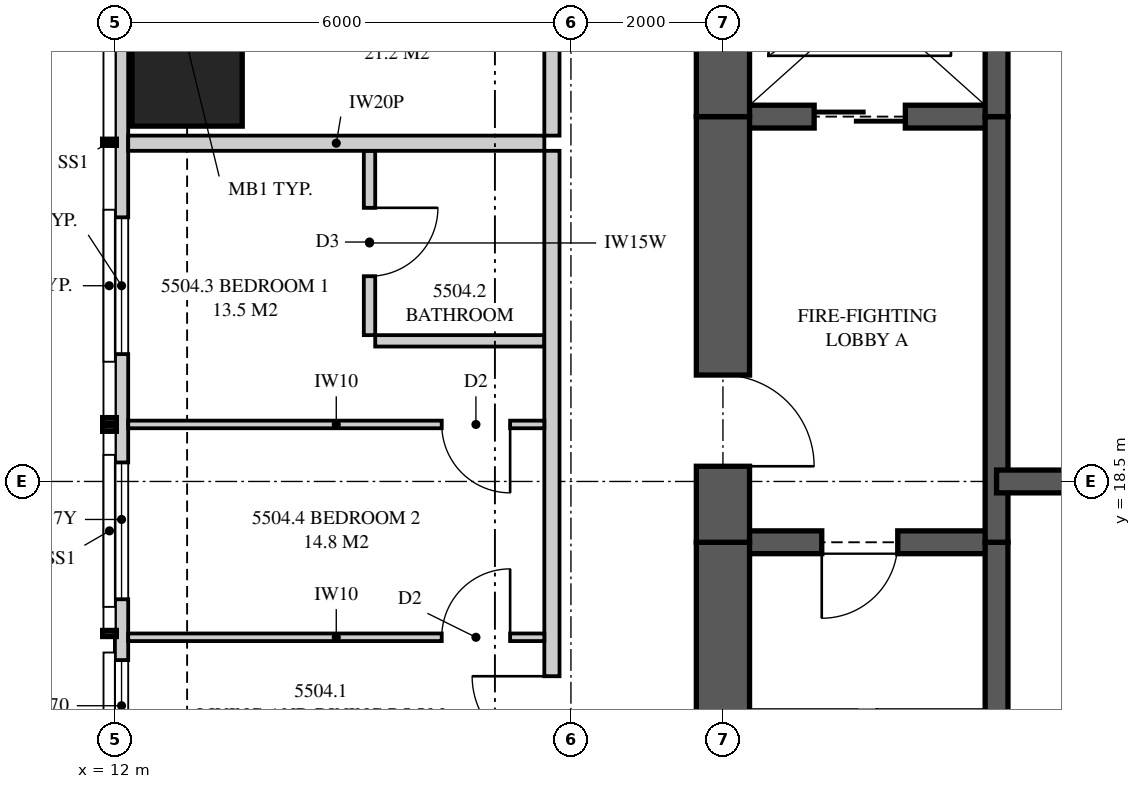
"""IFC4 building model, lengths in metres.
Left out: names, types, materials, properties, quantities, classifications, styles, units other than length and angle.
Written with IfcOpenShell. Run it as: python <this file> out.ifc"""

import sys

from ifc_helpers import new_model, si_unit, direction, frame, frame_2d, origin, origin_2d, place, context, subcontext, project, spatial, polyline, rectangle, outline, extrude, element, fill, save


model = new_model("IFC4")
c1 = context("Model", 3, precision=1e-05, world=origin(), true_north=direction((0.0, 1.0)))
c2 = subcontext(c1, "Body", "Model", "MODEL_VIEW")
j1 = project(units=[si_unit("LENGTHUNIT", "METRE"), si_unit("PLANEANGLEUNIT", "RADIAN")], contexts=[c1])
p1 = place(None, origin())
s1 = spatial("IfcSite", under=j1, at=p1, CompositionType="ELEMENT")
p2 = place(p1, origin())
s2 = spatial("IfcBuilding", under=s1, at=p2, CompositionType="ELEMENT")
p3 = place(p2, frame((0.0, 0.0, 201.25)))
s3 = spatial("IfcBuildingStorey", under=s2, at=p3, CompositionType="ELEMENT", Elevation=201.25)
p4 = place(p3, frame((12.95, 25.0, 0.0), z_axis=(0.0, 0.0, 1.0), x_axis=(1.0, 0.0, 0.0)))
e1 = element("IfcColumn", 1, at=p4, inside=s3, PredefinedType="COLUMN", context=c2, shape_type="SweptSolid", body=[
    extrude(rectangle(XDim=1.45, YDim=3.65, at=origin_2d()), origin(), (0.0, 0.0, 1.0), 3.35),
])
p5 = place(p3, frame((20.0, 26.225, 0.0), z_axis=(0.0, 0.0, 1.0), x_axis=(0.0, -1.0, 0.0)))
e2 = element("IfcWall", 2, at=p5, inside=s3, PredefinedType="SHEAR", context=c2, shape_type="SweptSolid", body=[
    extrude(rectangle(XDim=2.925, YDim=0.7, at=frame_2d((1.462, 0.0))), origin(), (0.0, 0.0, 1.0), 3.35),
])
p6 = place(p3, frame((20.0, 23.3, 0.0), z_axis=(0.0, 0.0, 1.0), x_axis=(0.0, -1.0, 0.0)))
e3 = element("IfcWall", 3, at=p6, inside=s3, PredefinedType="SHEAR", context=c2, shape_type="SweptSolid", body=[
    extrude(rectangle(XDim=5.6, YDim=0.7, at=frame_2d((2.8, 0.0))), origin(), (0.0, 0.0, 1.0), 3.35),
])
p7 = place(p6, frame((3.4, 0.0, 0.0)))
e4 = element("IfcOpeningElement", 4, at=p7, cuts=e3, PredefinedType="OPENING", context=c2, shape_type="SweptSolid", body=[
    extrude(rectangle(XDim=1.2, YDim=2.2, at=frame_2d((0.6, 1.1))), frame((0.0, 0.36, 0.0), z_axis=(0.0, -1.0, 0.0), x_axis=(1.0, 0.0, 0.0)), (0.0, 0.0, 1.0), 0.72),
])
p8 = place(p3, frame((20.0, 17.7, 0.0), z_axis=(0.0, 0.0, 1.0), x_axis=(0.0, -1.0, 0.0)))
e5 = element("IfcWall", 5, at=p8, inside=s3, PredefinedType="SHEAR", context=c2, shape_type="SweptSolid", body=[
    extrude(rectangle(XDim=4.7, YDim=0.7, at=frame_2d((2.35, 0.0))), origin(), (0.0, 0.0, 1.0), 3.35),
])
p9 = place(p3, frame((23.6, 10.775, 0.0), z_axis=(0.0, 0.0, 1.0), x_axis=(0.0, 1.0, 0.0)))
e6 = element("IfcWall", 6, at=p9, inside=s3, PredefinedType="SHEAR", context=c2, shape_type="SweptSolid", body=[
    extrude(rectangle(XDim=6.925, YDim=0.3, at=frame_2d((3.462, 0.0))), origin(), (0.0, 0.0, 1.0), 3.35),
])
p10 = place(p3, frame((23.6, 17.7, 0.0), z_axis=(0.0, 0.0, 1.0), x_axis=(0.0, 1.0, 0.0)))
e7 = element("IfcWall", 7, at=p10, inside=s3, PredefinedType="SHEAR", context=c2, shape_type="SweptSolid", body=[
    extrude(rectangle(XDim=5.6, YDim=0.3, at=frame_2d((2.8, 0.0))), origin(), (0.0, 0.0, 1.0), 3.35),
])
p11 = place(p3, frame((23.6, 23.3, 0.0), z_axis=(0.0, 0.0, 1.0), x_axis=(0.0, 1.0, 0.0)))
e8 = element("IfcWall", 8, at=p11, inside=s3, PredefinedType="SHEAR", context=c2, shape_type="SweptSolid", body=[
    extrude(rectangle(XDim=2.925, YDim=0.3, at=frame_2d((1.462, 0.0))), origin(), (0.0, 0.0, 1.0), 3.35),
])
p12 = place(p3, frame((20.0, 17.7, 0.0), z_axis=(0.0, 0.0, 1.0), x_axis=(1.0, 0.0, 0.0)))
e9 = element("IfcWall", 9, at=p12, inside=s3, PredefinedType="SHEAR", context=c2, shape_type="SweptSolid", body=[
    extrude(rectangle(XDim=3.6, YDim=0.3, at=frame_2d((1.8, 0.0))), origin(), (0.0, 0.0, 1.0), 3.35),
])
p13 = place(p12, frame((1.3, 0.0, 0.0)))
e10 = element("IfcOpeningElement", 10, at=p13, cuts=e9, PredefinedType="OPENING", context=c2, shape_type="SweptSolid", body=[
    extrude(rectangle(XDim=1.0, YDim=2.1, at=frame_2d((0.5, 1.05))), frame((0.0, 0.16, 0.0), z_axis=(0.0, -1.0, 0.0), x_axis=(1.0, 0.0, 0.0)), (0.0, 0.0, 1.0), 0.32),
])
p14 = place(p3, frame((20.0, 23.3, 0.0), z_axis=(0.0, 0.0, 1.0), x_axis=(1.0, 0.0, 0.0)))
e11 = element("IfcWall", 11, at=p14, inside=s3, PredefinedType="SHEAR", context=c2, shape_type="SweptSolid", body=[
    extrude(rectangle(XDim=3.6, YDim=0.3, at=frame_2d((1.8, 0.0))), origin(), (0.0, 0.0, 1.0), 3.35),
])
p15 = place(p14, frame((1.2, 0.0, 0.0)))
e12 = element("IfcOpeningElement", 12, at=p15, cuts=e11, PredefinedType="OPENING", context=c2, shape_type="SweptSolid", body=[
    extrude(rectangle(XDim=1.2, YDim=2.1, at=frame_2d((0.6, 1.05))), frame((0.0, 0.16, 0.0), z_axis=(0.0, -1.0, 0.0), x_axis=(1.0, 0.0, 0.0)), (0.0, 0.0, 1.0), 0.32),
])
p16 = place(p3, frame((23.6, 18.5, 0.0), z_axis=(0.0, 0.0, 1.0), x_axis=(1.0, 0.0, 0.0)))
e13 = element("IfcWall", 13, at=p16, inside=s3, PredefinedType="SHEAR", context=c2, shape_type="SweptSolid", body=[
    extrude(rectangle(XDim=2.4, YDim=0.3, at=frame_2d((1.2, 0.0))), origin(), (0.0, 0.0, 1.0), 3.35),
])
p17 = place(p3, frame((12.087, 32.949, 0.0), z_axis=(0.0, 0.0, 1.0), x_axis=(0.0, -1.0, 0.0)))
e14 = element("IfcWall", 14, at=p17, inside=s3, PredefinedType="SOLIDWALL", context=c2, shape_type="SweptSolid", body=[
    extrude(outline(polyline([(0.0, 0.0), (29.897, 0.0), (29.897, 3.11), (20.191, 3.11), (20.191, 2.15), (20.051, 2.15), (20.051, 3.11), (19.949, 3.11), (19.949, 2.15), (7.949, 2.15), (7.949, 3.11), (7.823, 3.11), (7.823, 2.15), (7.73, 2.15), (7.73, 3.11), (0.0, 3.11), (0.0, 0.0)])), frame((0.0, 0.087, 0.0), z_axis=(0.0, -1.0, 0.0), x_axis=(1.0, 0.0, 0.0)), (0.0, 0.0, 1.0), 0.175),
])
p18 = place(p17, frame((1.226, 0.0, 0.4)))
e15 = element("IfcOpeningElement", 15, at=p18, cuts=e14, PredefinedType="OPENING", context=c2, shape_type="SweptSolid", body=[
    extrude(rectangle(XDim=1.8, YDim=1.7, at=frame_2d((0.9, 0.85))), frame((0.0, 0.097, 0.0), z_axis=(0.0, -1.0, 0.0), x_axis=(1.0, 0.0, 0.0)), (0.0, 0.0, 1.0), 0.195),
])
p19 = place(p17, frame((4.224, 0.0, 0.4)))
e16 = element("IfcOpeningElement", 16, at=p19, cuts=e14, PredefinedType="OPENING", context=c2, shape_type="SweptSolid", body=[
    extrude(rectangle(XDim=1.8, YDim=1.7, at=frame_2d((0.9, 0.85))), frame((0.0, 0.097, 0.0), z_axis=(0.0, -1.0, 0.0), x_axis=(1.0, 0.0, 0.0)), (0.0, 0.0, 1.0), 0.195),
])
p20 = place(p17, frame((10.974, 0.0, 0.4)))
e17 = element("IfcOpeningElement", 17, at=p20, cuts=e14, PredefinedType="OPENING", context=c2, shape_type="SweptSolid", body=[
    extrude(rectangle(XDim=1.8, YDim=1.7, at=frame_2d((0.9, 0.85))), frame((0.0, 0.097, 0.0), z_axis=(0.0, -1.0, 0.0), x_axis=(1.0, 0.0, 0.0)), (0.0, 0.0, 1.0), 0.195),
])
p21 = place(p17, frame((14.199, 0.0, 0.4)))
e18 = element("IfcOpeningElement", 18, at=p21, cuts=e14, PredefinedType="OPENING", context=c2, shape_type="SweptSolid", body=[
    extrude(rectangle(XDim=1.8, YDim=1.7, at=frame_2d((0.9, 0.85))), frame((0.0, 0.097, 0.0), z_axis=(0.0, -1.0, 0.0), x_axis=(1.0, 0.0, 0.0)), (0.0, 0.0, 1.0), 0.195),
])
p22 = place(p17, frame((22.624, 0.0, 0.0)))
e19 = element("IfcOpeningElement", 19, at=p22, cuts=e14, PredefinedType="OPENING", context=c2, shape_type="SweptSolid", body=[
    extrude(rectangle(XDim=1.8, YDim=2.1, at=frame_2d((0.9, 1.05))), frame((0.0, 0.097, 0.0), z_axis=(0.0, -1.0, 0.0), x_axis=(1.0, 0.0, 0.0)), (0.0, 0.0, 1.0), 0.195),
])
p23 = place(p17, frame((16.799, 0.0, 0.4)))
e20 = element("IfcOpeningElement", 20, at=p23, cuts=e14, PredefinedType="OPENING", context=c2, shape_type="SweptSolid", body=[
    extrude(rectangle(XDim=1.2, YDim=1.7, at=frame_2d((0.6, 0.85))), frame((0.0, 0.097, 0.0), z_axis=(0.0, -1.0, 0.0), x_axis=(1.0, 0.0, 0.0)), (0.0, 0.0, 1.0), 0.195),
])
p24 = place(p17, frame((26.371, 0.0, 0.4)))
e21 = element("IfcOpeningElement", 21, at=p24, cuts=e14, PredefinedType="OPENING", context=c2, shape_type="SweptSolid", body=[
    extrude(rectangle(XDim=1.8, YDim=1.7, at=frame_2d((0.9, 0.85))), frame((0.0, 0.097, 0.0), z_axis=(0.0, -1.0, 0.0), x_axis=(1.0, 0.0, 0.0)), (0.0, 0.0, 1.0), 0.195),
])
p25 = place(p3, frame((12.175, 22.95, 0.0), z_axis=(0.0, 0.0, 1.0), x_axis=(1.0, 0.0, 0.0)))
e22 = element("IfcWall", 22, at=p25, inside=s3, PredefinedType="PARTITIONING", context=c2, shape_type="SweptSolid", body=[
    extrude(outline(polyline([(0.0, 0.0), (5.475, 0.0), (5.475, 3.11), (1.685, 3.11), (1.685, 2.15), (0.0, 2.15), (0.0, 3.11), (0.0, 0.0)])), frame((0.0, 0.1, 0.0), z_axis=(0.0, -1.0, 0.0), x_axis=(1.0, 0.0, 0.0)), (0.0, 0.0, 1.0), 0.2),
])
p26 = place(p3, frame((17.75, 7.925, 0.0), z_axis=(0.0, 0.0, 1.0), x_axis=(0.0, 1.0, 0.0)))
e23 = element("IfcWall", 23, at=p26, inside=s3, PredefinedType="PARTITIONING", context=c2, shape_type="SweptSolid", body=[
    extrude(outline(polyline([(0.0, 0.0), (14.925, 0.0), (14.925, 3.11), (5.412, 3.11), (5.412, 2.541), (4.738, 2.541), (4.738, 3.11), (0.0, 3.11), (0.0, 0.0)])), frame((0.0, 0.1, 0.0), z_axis=(0.0, -1.0, 0.0), x_axis=(1.0, 0.0, 0.0)), (0.0, 0.0, 1.0), 0.2),
])
p27 = place(p26, frame((6.962, 0.0, 0.0)))
e24 = element("IfcOpeningElement", 24, at=p27, cuts=e23, PredefinedType="OPENING", context=c2, shape_type="SweptSolid", body=[
    extrude(rectangle(XDim=1.05, YDim=2.2, at=frame_2d((0.525, 1.1))), frame((0.0, 0.11, 0.0), z_axis=(0.0, -1.0, 0.0), x_axis=(1.0, 0.0, 0.0)), (0.0, 0.0, 1.0), 0.22),
])
p28 = place(p3, frame((15.35, 20.425, 0.0), z_axis=(0.0, 0.0, 1.0), x_axis=(0.0, 1.0, 0.0)))
e25 = element("IfcWall", 25, at=p28, inside=s3, PredefinedType="PLUMBINGWALL", context=c2, shape_type="SweptSolid", body=[
    extrude(rectangle(XDim=2.425, YDim=0.15, at=frame_2d((1.212, 0.0))), origin(), (0.0, 0.0, 1.0), 3.11),
])
p29 = place(p28, frame((0.775, 0.0, 0.0)))
e26 = element("IfcOpeningElement", 26, at=p29, cuts=e25, PredefinedType="OPENING", context=c2, shape_type="SweptSolid", body=[
    extrude(rectangle(XDim=0.9, YDim=2.1, at=frame_2d((0.45, 1.05))), frame((0.0, 0.085, 0.0), z_axis=(0.0, -1.0, 0.0), x_axis=(1.0, 0.0, 0.0)), (0.0, 0.0, 1.0), 0.17),
])
p30 = place(p3, frame((15.425, 20.35, 0.0), z_axis=(0.0, 0.0, 1.0), x_axis=(1.0, 0.0, 0.0)))
e27 = element("IfcWall", 27, at=p30, inside=s3, PredefinedType="PLUMBINGWALL", context=c2, shape_type="SweptSolid", body=[
    extrude(rectangle(XDim=2.225, YDim=0.15, at=frame_2d((1.112, 0.0))), origin(), (0.0, 0.0, 1.0), 3.11),
])
p31 = place(p3, frame((12.175, 19.25, 0.0), z_axis=(0.0, 0.0, 1.0), x_axis=(1.0, 0.0, 0.0)))
e28 = element("IfcWall", 28, at=p31, inside=s3, PredefinedType="PARTITIONING", context=c2, shape_type="SweptSolid", body=[
    extrude(outline(polyline([(0.0, 0.0), (5.475, 0.0), (5.475, 3.11), (1.635, 3.11), (1.635, 2.15), (0.0, 2.15), (0.0, 3.11), (0.0, 0.0)])), frame((0.0, 0.05, 0.0), z_axis=(0.0, -1.0, 0.0), x_axis=(1.0, 0.0, 0.0)), (0.0, 0.0, 1.0), 0.1),
])
p32 = place(p31, frame((4.125, 0.0, 0.0)))
e29 = element("IfcOpeningElement", 29, at=p32, cuts=e28, PredefinedType="OPENING", context=c2, shape_type="SweptSolid", body=[
    extrude(rectangle(XDim=0.9, YDim=2.1, at=frame_2d((0.45, 1.05))), frame((0.0, 0.06, 0.0), z_axis=(0.0, -1.0, 0.0), x_axis=(1.0, 0.0, 0.0)), (0.0, 0.0, 1.0), 0.12),
])
p33 = place(p3, frame((12.175, 16.45, 0.0), z_axis=(0.0, 0.0, 1.0), x_axis=(1.0, 0.0, 0.0)))
e30 = element("IfcWall", 30, at=p33, inside=s3, PredefinedType="PARTITIONING", context=c2, shape_type="SweptSolid", body=[
    extrude(outline(polyline([(0.0, 0.0), (5.475, 0.0), (5.475, 3.11), (1.635, 3.11), (1.635, 2.15), (0.0, 2.15), (0.0, 3.11), (0.0, 0.0)])), frame((0.0, 0.05, 0.0), z_axis=(0.0, -1.0, 0.0), x_axis=(1.0, 0.0, 0.0)), (0.0, 0.0, 1.0), 0.1),
])
p34 = place(p33, frame((4.125, 0.0, 0.0)))
e31 = element("IfcOpeningElement", 31, at=p34, cuts=e30, PredefinedType="OPENING", context=c2, shape_type="SweptSolid", body=[
    extrude(rectangle(XDim=0.9, YDim=2.1, at=frame_2d((0.45, 1.05))), frame((0.0, 0.06, 0.0), z_axis=(0.0, -1.0, 0.0), x_axis=(1.0, 0.0, 0.0)), (0.0, 0.0, 1.0), 0.12),
])
p35 = place(p3, frame((17.75, 23.05, 0.0), z_axis=(0.0, 0.0, 1.0), x_axis=(0.0, 1.0, 0.0)))
e32 = element("IfcWall", 32, at=p35, inside=s3, PredefinedType="PARTITIONING", context=c2, shape_type="SweptSolid", body=[
    extrude(outline(polyline([(0.0, 0.0), (6.025, 0.0), (6.025, 3.11), (2.287, 3.11), (2.287, 2.541), (1.613, 2.541), (1.613, 3.11), (0.0, 3.11), (0.0, 0.0)])), frame((0.0, 0.1, 0.0), z_axis=(0.0, -1.0, 0.0), x_axis=(1.0, 0.0, 0.0)), (0.0, 0.0, 1.0), 0.2),
])
p36 = place(p35, frame((2.512, 0.0, 0.0)))
e33 = element("IfcOpeningElement", 33, at=p36, cuts=e32, PredefinedType="OPENING", context=c2, shape_type="SweptSolid", body=[
    extrude(rectangle(XDim=1.05, YDim=2.2, at=frame_2d((0.525, 1.1))), frame((0.0, 0.11, 0.0), z_axis=(0.0, -1.0, 0.0), x_axis=(1.0, 0.0, 0.0)), (0.0, 0.0, 1.0), 0.22),
])
p37 = place(p20, origin())
e34 = element("IfcWindow", 34, at=p37, inside=s3, PartitioningType="SINGLE_PANEL", PredefinedType="WINDOW", context=c2, shape_type="SweptSolid", body=[
    extrude(rectangle(XDim=1.8, YDim=1.7, at=frame_2d((0.9, 0.85))), frame((0.0, 0.03, 0.0), z_axis=(0.0, -1.0, 0.0), x_axis=(1.0, 0.0, 0.0)), (0.0, 0.0, 1.0), 0.06),
])
fill(e17, e34)
p38 = place(p21, origin())
e35 = element("IfcWindow", 35, at=p38, inside=s3, PartitioningType="SINGLE_PANEL", PredefinedType="WINDOW", context=c2, shape_type="SweptSolid", body=[
    extrude(rectangle(XDim=1.8, YDim=1.7, at=frame_2d((0.9, 0.85))), frame((0.0, 0.03, 0.0), z_axis=(0.0, -1.0, 0.0), x_axis=(1.0, 0.0, 0.0)), (0.0, 0.0, 1.0), 0.06),
])
fill(e18, e35)
p39 = place(p23, origin())
e36 = element("IfcWindow", 36, at=p39, inside=s3, PartitioningType="SINGLE_PANEL", PredefinedType="WINDOW", context=c2, shape_type="SweptSolid", body=[
    extrude(rectangle(XDim=1.2, YDim=1.7, at=frame_2d((0.6, 0.85))), frame((0.0, 0.03, 0.0), z_axis=(0.0, -1.0, 0.0), x_axis=(1.0, 0.0, 0.0)), (0.0, 0.0, 1.0), 0.06),
])
fill(e20, e36)
p40 = place(p27, origin())
e37 = element("IfcDoor", 37, at=p40, inside=s3, OperationType="SINGLE_SWING_RIGHT", PredefinedType="DOOR", context=c2, shape_type="SweptSolid", body=[
    extrude(rectangle(XDim=1.05, YDim=2.2, at=frame_2d((0.525, 1.1))), frame((0.0, 0.025, 0.0), z_axis=(0.0, -1.0, 0.0), x_axis=(1.0, 0.0, 0.0)), (0.0, 0.0, 1.0), 0.05),
])
fill(e24, e37)
p41 = place(p29, frame((0.9, 0.0, 0.0), z_axis=(0.0, 0.0, 1.0), x_axis=(-1.0, 0.0, 0.0)))
e38 = element("IfcDoor", 38, at=p41, inside=s3, OperationType="SINGLE_SWING_LEFT", PredefinedType="DOOR", context=c2, shape_type="SweptSolid", body=[
    extrude(rectangle(XDim=0.9, YDim=2.1, at=frame_2d((0.45, 1.05))), frame((0.0, 0.025, 0.0), z_axis=(0.0, -1.0, 0.0), x_axis=(1.0, 0.0, 0.0)), (0.0, 0.0, 1.0), 0.05),
])
fill(e26, e38)
p42 = place(p32, frame((0.9, 0.0, 0.0), z_axis=(0.0, 0.0, 1.0), x_axis=(-1.0, 0.0, 0.0)))
e39 = element("IfcDoor", 39, at=p42, inside=s3, OperationType="SINGLE_SWING_LEFT", PredefinedType="DOOR", context=c2, shape_type="SweptSolid", body=[
    extrude(rectangle(XDim=0.9, YDim=2.1, at=frame_2d((0.45, 1.05))), frame((0.0, 0.025, 0.0), z_axis=(0.0, -1.0, 0.0), x_axis=(1.0, 0.0, 0.0)), (0.0, 0.0, 1.0), 0.05),
])
fill(e29, e39)
p43 = place(p34, origin())
e40 = element("IfcDoor", 40, at=p43, inside=s3, OperationType="SINGLE_SWING_RIGHT", PredefinedType="DOOR", context=c2, shape_type="SweptSolid", body=[
    extrude(rectangle(XDim=0.9, YDim=2.1, at=frame_2d((0.45, 1.05))), frame((0.0, 0.025, 0.0), z_axis=(0.0, -1.0, 0.0), x_axis=(1.0, 0.0, 0.0)), (0.0, 0.0, 1.0), 0.05),
])
fill(e31, e40)
p44 = place(p13, frame((1.0, 0.0, 0.0), z_axis=(0.0, 0.0, 1.0), x_axis=(-1.0, 0.0, 0.0)))
e41 = element("IfcDoor", 41, at=p44, inside=s3, OperationType="SINGLE_SWING_RIGHT", PredefinedType="DOOR", context=c2, shape_type="SweptSolid", body=[
    extrude(rectangle(XDim=1.0, YDim=2.1, at=frame_2d((0.5, 1.05))), frame((0.0, 0.025, 0.0), z_axis=(0.0, -1.0, 0.0), x_axis=(1.0, 0.0, 0.0)), (0.0, 0.0, 1.0), 0.05),
])
fill(e10, e41)
p45 = place(p7, origin())
e42 = element("IfcDoor", 42, at=p45, inside=s3, OperationType="SINGLE_SWING_RIGHT", PredefinedType="DOOR", context=c2, shape_type="SweptSolid", body=[
    extrude(rectangle(XDim=1.2, YDim=2.2, at=frame_2d((0.6, 1.1))), frame((0.0, 0.025, 0.0), z_axis=(0.0, -1.0, 0.0), x_axis=(1.0, 0.0, 0.0)), (0.0, 0.0, 1.0), 0.05),
])
fill(e4, e42)
p46 = place(p15, origin())
e43 = element("IfcDoor", 43, at=p46, inside=s3, OperationType="SLIDING_TO_LEFT", PredefinedType="DOOR", context=c2, shape_type="SweptSolid", body=[
    extrude(rectangle(XDim=1.2, YDim=2.1, at=frame_2d((0.6, 1.05))), frame((0.0, 0.025, 0.0), z_axis=(0.0, -1.0, 0.0), x_axis=(1.0, 0.0, 0.0)), (0.0, 0.0, 1.0), 0.05),
])
fill(e12, e43)
save(model, sys.argv[1])
